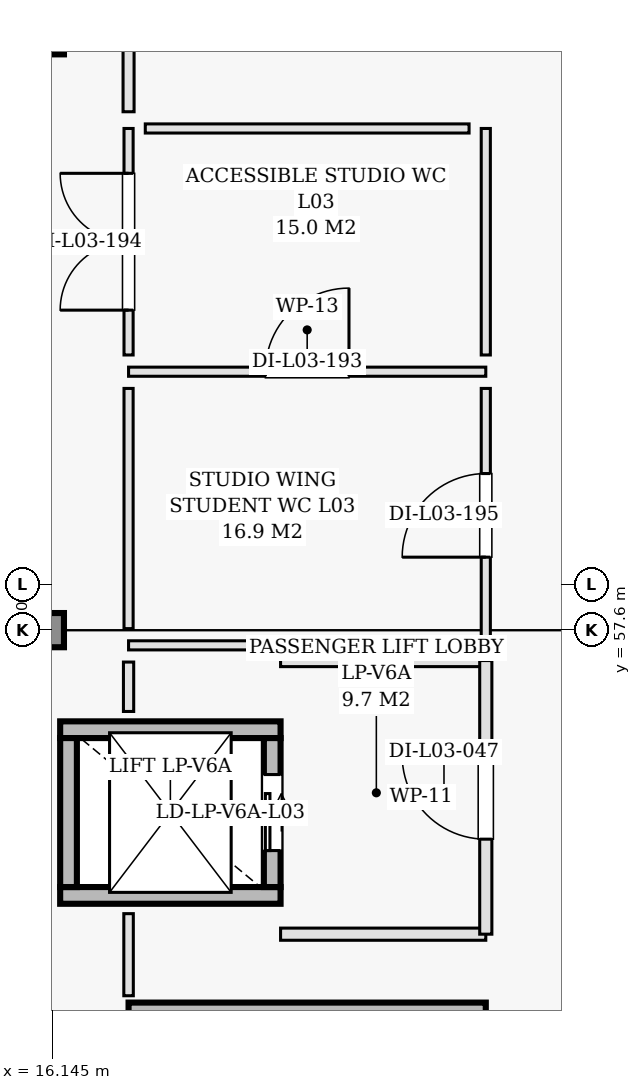
"""IFC4 building model, lengths in metres.
Left out: names, types, materials, properties, quantities, classifications, styles, units other than length and angle.
Written with IfcOpenShell. Run it as: python <this file> out.ifc"""

import sys

from ifc_helpers import new_model, si_unit, direction, frame, frame_2d, origin, origin_2d, place, context, subcontext, project, spatial, rectangle, extrude, element, fill, save


model = new_model("IFC4")
c1 = context("Model", 3, precision=1e-05, world=origin(), true_north=direction((0.0, 1.0)))
c2 = subcontext(c1, "Body", "Model", "MODEL_VIEW")
j1 = project(units=[si_unit("LENGTHUNIT", "METRE"), si_unit("PLANEANGLEUNIT", "RADIAN")], contexts=[c1])
p1 = place(None, origin())
s1 = spatial("IfcSite", under=j1, at=p1, CompositionType="ELEMENT")
p2 = place(p1, origin())
s2 = spatial("IfcBuilding", under=s1, at=p2, CompositionType="ELEMENT")
p3 = place(p2, frame((0.0, 0.0, 13.8)))
s3 = spatial("IfcBuildingStorey", under=s2, at=p3, CompositionType="ELEMENT", Elevation=13.8)
for number, where, z_axis, x_axis in (
    (1, (16.0, 57.6, 0.0), (0.0, 0.0, 1.0), (1.0, 0.0, 0.0)),
    (2, (16.0, 65.4, 0.0), (0.0, 0.0, 1.0), (1.0, 0.0, 0.0)),
):
    element("IfcColumn", number, at=place(p3, frame(where, z_axis=z_axis, x_axis=x_axis)), inside=s3, PredefinedType="COLUMN", context=c2, shape_type="SweptSolid", body=[
        extrude(rectangle(XDim=0.45, YDim=0.45, at=origin_2d()), origin(), (0.0, 0.0, 1.0), 4.2),
    ])
p4 = place(p3, frame((17.15, 52.55, 0.0), z_axis=(0.0, 0.0, 1.0), x_axis=(1.0, 0.0, 0.0)))
e3 = element("IfcWall", 3, at=p4, inside=s3, PredefinedType="SHEAR", context=c2, shape_type="SweptSolid", body=[
    extrude(rectangle(XDim=4.7, YDim=0.3, at=frame_2d((2.35, 0.0))), origin(), (0.0, 0.0, 1.0), 4.0),
])
for number, where, z_axis, x_axis in (
    (4, (16.25, 54.11, 0.0), (0.0, 0.0, 1.0), (1.0, 0.0, 0.0)),
    (5, (16.25, 56.29, 0.0), (0.0, 0.0, 1.0), (1.0, 0.0, 0.0)),
):
    element("IfcWall", number, at=place(p3, frame(where, z_axis=z_axis, x_axis=x_axis)), inside=s3, PredefinedType="SHEAR", context=c2, shape_type="SweptSolid", body=[
        extrude(rectangle(XDim=2.9, YDim=0.22, at=frame_2d((1.45, 0.0))), origin(), (0.0, 0.0, 1.0), 3.85),
    ])
p5 = place(p3, frame((16.36, 54.22, 0.0), z_axis=(0.0, 0.0, 1.0), x_axis=(0.0, 1.0, 0.0)))
e6 = element("IfcWall", 6, at=p5, inside=s3, PredefinedType="SHEAR", context=c2, shape_type="SweptSolid", body=[
    extrude(rectangle(XDim=1.96, YDim=0.22, at=frame_2d((0.98, 0.0))), origin(), (0.0, 0.0, 1.0), 3.85),
])
p6 = place(p3, frame((19.04, 54.22, 0.0), z_axis=(0.0, 0.0, 1.0), x_axis=(0.0, 1.0, 0.0)))
e7 = element("IfcWall", 7, at=p6, inside=s3, PredefinedType="SHEAR", context=c2, shape_type="SweptSolid", body=[
    extrude(rectangle(XDim=1.96, YDim=0.22, at=frame_2d((0.98, 0.0))), origin(), (0.0, 0.0, 1.0), 3.85),
])
p7 = place(p6, frame((0.48, 0.0, 0.0)))
e8 = element("IfcOpeningElement", 8, at=p7, cuts=e7, PredefinedType="OPENING", context=c2, shape_type="SweptSolid", body=[
    extrude(rectangle(XDim=1.0, YDim=2.15, at=frame_2d((0.5, 1.075))), frame((0.0, 0.12, 0.0), z_axis=(0.0, -1.0, 0.0), x_axis=(1.0, 0.0, 0.0)), (0.0, 0.0, 1.0), 0.24),
])
for number, where, z_axis, x_axis in (
    (9, (19.15, 53.6, 0.0), (0.0, 0.0, 1.0), (1.0, 0.0, 0.0)),
    (10, (19.15, 57.2, 0.0), (0.0, 0.0, 1.0), (1.0, 0.0, 0.0)),
):
    element("IfcWall", number, at=place(p3, frame(where, z_axis=z_axis, x_axis=x_axis)), inside=s3, PredefinedType="PARTITIONING", context=c2, shape_type="SweptSolid", body=[
        extrude(rectangle(XDim=2.7, YDim=0.16, at=frame_2d((1.35, 0.0))), origin(), (0.0, 0.0, 1.0), 3.85),
    ])
p8 = place(p3, frame((21.85, 53.6, 0.0), z_axis=(0.0, 0.0, 1.0), x_axis=(0.0, 1.0, 0.0)))
e11 = element("IfcWall", 11, at=p8, inside=s3, PredefinedType="PARTITIONING", context=c2, shape_type="SweptSolid", body=[
    extrude(rectangle(XDim=3.6, YDim=0.16, at=frame_2d((1.8, 0.0))), origin(), (0.0, 0.0, 1.0), 3.85),
])
p9 = place(p8, frame((1.25, 0.0, 0.0)))
e12 = element("IfcOpeningElement", 12, at=p9, cuts=e11, PredefinedType="OPENING", context=c2, shape_type="SweptSolid", body=[
    extrude(rectangle(XDim=1.1, YDim=2.15, at=frame_2d((0.55, 1.075))), frame((0.0, 0.09, 0.0), z_axis=(0.0, -1.0, 0.0), x_axis=(1.0, 0.0, 0.0)), (0.0, 0.0, 1.0), 0.18),
])
p10 = place(p3, frame((17.15, 61.0, 0.0), z_axis=(0.0, 0.0, 1.0), x_axis=(1.0, 0.0, 0.0)))
e13 = element("IfcWall", 13, at=p10, inside=s3, PredefinedType="PARTITIONING", context=c2, shape_type="SweptSolid", body=[
    extrude(rectangle(XDim=4.7, YDim=0.12, at=frame_2d((2.35, 0.0))), origin(), (0.0, 0.0, 1.0), 3.96),
])
p11 = place(p10, frame((1.8, 0.0, 0.0)))
e14 = element("IfcOpeningElement", 14, at=p11, cuts=e13, PredefinedType="OPENING", context=c2, shape_type="SweptSolid", body=[
    extrude(rectangle(XDim=1.1, YDim=2.15, at=frame_2d((0.55, 1.075))), frame((0.0, 0.07, 0.0), z_axis=(0.0, -1.0, 0.0), x_axis=(1.0, 0.0, 0.0)), (0.0, 0.0, 1.0), 0.14),
])
p12 = place(p3, frame((21.85, 61.22, 0.0), z_axis=(0.0, 0.0, 1.0), x_axis=(0.0, 1.0, 0.0)))
e15 = element("IfcWall", 15, at=p12, inside=s3, PredefinedType="PARTITIONING", context=c2, shape_type="SweptSolid", body=[
    extrude(rectangle(XDim=2.98, YDim=0.12, at=frame_2d((1.49, 0.0))), origin(), (0.0, 0.0, 1.0), 3.96),
])
p13 = place(p3, frame((17.15, 61.22, 0.0), z_axis=(0.0, 0.0, 1.0), x_axis=(0.0, 1.0, 0.0)))
e16 = element("IfcWall", 16, at=p13, inside=s3, PredefinedType="PARTITIONING", context=c2, shape_type="SweptSolid", body=[
    extrude(rectangle(XDim=2.98, YDim=0.12, at=frame_2d((1.49, 0.0))), origin(), (0.0, 0.0, 1.0), 3.96),
])
p14 = place(p13, frame((0.59, 0.0, 0.0)))
e17 = element("IfcOpeningElement", 17, at=p14, cuts=e16, PredefinedType="OPENING", context=c2, shape_type="SweptSolid", body=[
    extrude(rectangle(XDim=1.8, YDim=2.2, at=frame_2d((0.9, 1.1))), frame((0.0, 0.07, 0.0), z_axis=(0.0, -1.0, 0.0), x_axis=(1.0, 0.0, 0.0)), (0.0, 0.0, 1.0), 0.14),
])
p15 = place(p3, frame((17.37, 64.2, 0.0), z_axis=(0.0, 0.0, 1.0), x_axis=(1.0, 0.0, 0.0)))
e18 = element("IfcWall", 18, at=p15, inside=s3, PredefinedType="PARTITIONING", context=c2, shape_type="SweptSolid", body=[
    extrude(rectangle(XDim=4.26, YDim=0.12, at=frame_2d((2.13, 0.0))), origin(), (0.0, 0.0, 1.0), 3.96),
])
p16 = place(p3, frame((21.85, 57.44, 0.0), z_axis=(0.0, 0.0, 1.0), x_axis=(0.0, 1.0, 0.0)))
e19 = element("IfcWall", 19, at=p16, inside=s3, PredefinedType="PARTITIONING", context=c2, shape_type="SweptSolid", body=[
    extrude(rectangle(XDim=3.34, YDim=0.12, at=frame_2d((1.67, 0.0))), origin(), (0.0, 0.0, 1.0), 3.485),
])
p17 = place(p16, frame((1.12, 0.0, 0.0)))
e20 = element("IfcOpeningElement", 20, at=p17, cuts=e19, PredefinedType="OPENING", context=c2, shape_type="SweptSolid", body=[
    extrude(rectangle(XDim=1.1, YDim=2.15, at=frame_2d((0.55, 1.075))), frame((0.0, 0.07, 0.0), z_axis=(0.0, -1.0, 0.0), x_axis=(1.0, 0.0, 0.0)), (0.0, 0.0, 1.0), 0.14),
])
p18 = place(p3, frame((17.15, 57.4, 0.0), z_axis=(0.0, 0.0, 1.0), x_axis=(1.0, 0.0, 0.0)))
e21 = element("IfcWall", 21, at=p18, inside=s3, PredefinedType="PARTITIONING", context=c2, shape_type="SweptSolid", body=[
    extrude(rectangle(XDim=1.867, YDim=0.12, at=frame_2d((0.934, 0.0))), origin(), (0.0, 0.0, 1.0), 3.485),
])
p19 = place(p3, frame((17.15, 57.62, 0.0), z_axis=(0.0, 0.0, 1.0), x_axis=(0.0, 1.0, 0.0)))
e22 = element("IfcWall", 22, at=p19, inside=s3, PredefinedType="PARTITIONING", context=c2, shape_type="SweptSolid", body=[
    extrude(rectangle(XDim=3.16, YDim=0.12, at=frame_2d((1.58, 0.0))), origin(), (0.0, 0.0, 1.0), 3.485),
])
p20 = place(p3, frame((17.15, 64.42, 0.0), z_axis=(0.0, 0.0, 1.0), x_axis=(0.0, 1.0, 0.0)))
e23 = element("IfcWall", 23, at=p20, inside=s3, PredefinedType="PARTITIONING", context=c2, shape_type="SweptSolid", body=[
    extrude(rectangle(XDim=0.98, YDim=0.145, at=frame_2d((0.49, 0.0))), origin(), (0.0, 0.0, 1.0), 3.485),
])
p21 = place(p3, frame((17.15, 56.53, 0.0), z_axis=(0.0, 0.0, 1.0), x_axis=(0.0, 1.0, 0.0)))
e24 = element("IfcWall", 24, at=p21, inside=s3, PredefinedType="PARTITIONING", context=c2, shape_type="SweptSolid", body=[
    extrude(rectangle(XDim=0.65, YDim=0.135, at=frame_2d((0.325, 0.0))), origin(), (0.0, 0.0, 1.0), 3.96),
])
p22 = place(p3, frame((17.15, 52.79, 0.0), z_axis=(0.0, 0.0, 1.0), x_axis=(0.0, 1.0, 0.0)))
e25 = element("IfcWall", 25, at=p22, inside=s3, PredefinedType="PARTITIONING", context=c2, shape_type="SweptSolid", body=[
    extrude(rectangle(XDim=1.08, YDim=0.125, at=frame_2d((0.54, 0.0))), origin(), (0.0, 0.0, 1.0), 3.96),
])
p23 = place(p7, origin())
e26 = element("IfcDoor", 26, at=p23, inside=s3, OperationType="SLIDING_TO_LEFT", PredefinedType="DOOR", context=c2, shape_type="SweptSolid", body=[
    extrude(rectangle(XDim=1.0, YDim=2.15, at=frame_2d((0.5, 1.075))), frame((0.0, 0.025, 0.0), z_axis=(0.0, -1.0, 0.0), x_axis=(1.0, 0.0, 0.0)), (0.0, 0.0, 1.0), 0.05),
])
fill(e8, e26)
p24 = place(p9, origin())
e27 = element("IfcDoor", 27, at=p24, inside=s3, OperationType="SINGLE_SWING_RIGHT", PredefinedType="DOOR", context=c2, shape_type="SweptSolid", body=[
    extrude(rectangle(XDim=1.1, YDim=2.15, at=frame_2d((0.55, 1.075))), frame((0.0, 0.025, 0.0), z_axis=(0.0, -1.0, 0.0), x_axis=(1.0, 0.0, 0.0)), (0.0, 0.0, 1.0), 0.05),
])
fill(e12, e27)
p25 = place(p11, origin())
e28 = element("IfcDoor", 28, at=p25, inside=s3, OperationType="SINGLE_SWING_RIGHT", PredefinedType="DOOR", context=c2, shape_type="SweptSolid", body=[
    extrude(rectangle(XDim=1.1, YDim=2.15, at=frame_2d((0.55, 1.075))), frame((0.0, 0.025, 0.0), z_axis=(0.0, -1.0, 0.0), x_axis=(1.0, 0.0, 0.0)), (0.0, 0.0, 1.0), 0.05),
])
fill(e14, e28)
p26 = place(p14, origin())
e29 = element("IfcDoor", 29, at=p26, inside=s3, OperationType="DOUBLE_DOOR_SINGLE_SWING", PredefinedType="DOOR", context=c2, shape_type="SweptSolid", body=[
    extrude(rectangle(XDim=1.8, YDim=2.2, at=frame_2d((0.9, 1.1))), frame((0.0, 0.025, 0.0), z_axis=(0.0, -1.0, 0.0), x_axis=(1.0, 0.0, 0.0)), (0.0, 0.0, 1.0), 0.05),
])
fill(e17, e29)
p27 = place(p17, origin())
e30 = element("IfcDoor", 30, at=p27, inside=s3, OperationType="SINGLE_SWING_LEFT", PredefinedType="DOOR", context=c2, shape_type="SweptSolid", body=[
    extrude(rectangle(XDim=1.1, YDim=2.15, at=frame_2d((0.55, 1.075))), frame((0.0, 0.025, 0.0), z_axis=(0.0, -1.0, 0.0), x_axis=(1.0, 0.0, 0.0)), (0.0, 0.0, 1.0), 0.05),
])
fill(e20, e30)
save(model, sys.argv[1])
